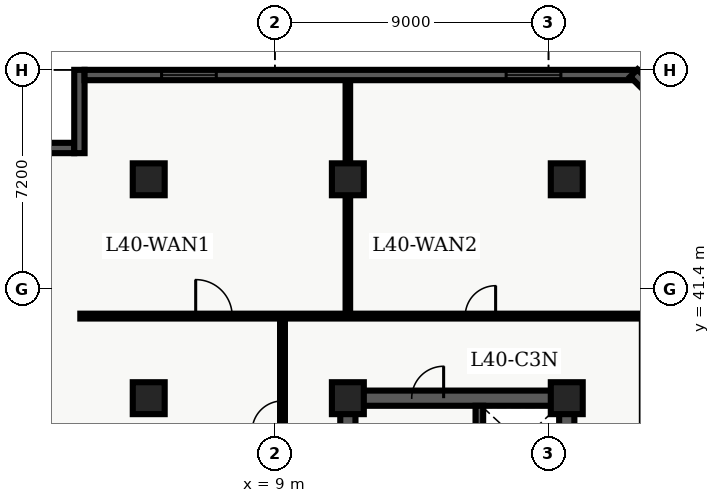
"""IFC4 building model, lengths in metres.
Left out: names, types, materials, properties, quantities, classifications, styles, units other than length and angle.
Written with IfcOpenShell. Run it as: python <this file> out.ifc"""

import sys

from ifc_helpers import new_model, entity, si_unit, converted_unit, direction, frame, origin_with_axes, origin_2d_with_axis, place, context, subcontext, project, spatial, polyline, rectangle, outline, extrude, element, fill, save


model = new_model("IFC4")
c1 = context("Model", 3, precision=1e-05, world=origin_with_axes(), true_north=direction((0.0, 1.0)))
c2 = subcontext(c1, "Body", "Model", "MODEL_VIEW")
j1 = project(units=[si_unit("LENGTHUNIT", "METRE"), converted_unit("PLANEANGLEUNIT", "DEGREE", entity("IfcPlaneAngleMeasure", 0.017), si_unit("PLANEANGLEUNIT", "RADIAN"), dimensions=[0, 0, 0, 0, 0, 0, 0])], contexts=[c1])
p1 = place(None, origin_with_axes())
s1 = spatial("IfcSite", under=j1, at=p1, CompositionType="ELEMENT")
p2 = place(p1, origin_with_axes())
s2 = spatial("IfcBuilding", under=s1, at=p2, CompositionType="ELEMENT")
p3 = place(p2, frame((0.0, 0.0, 164.1), z_axis=(0.0, 0.0, 1.0), x_axis=(1.0, 0.0, 0.0)))
s3 = spatial("IfcBuildingStorey", under=s2, at=p3, CompositionType="ELEMENT", Elevation=164.1)
p4 = place(p3, frame((11.4, 10.8, 0.0), z_axis=(0.0, 0.0, 1.0), x_axis=(0.0, 1.0, 0.0)))
e1 = element("IfcWall", 1, at=p4, inside=s3, PredefinedType="SHEAR", context=c2, shape_type="SweptSolid", body=[
    extrude(outline(polyline([(0.0, -0.25), (27.0, -0.25), (27.0, 0.25), (0.0, 0.25), (0.0, -0.25)])), origin_with_axes(), (0.0, 0.0, 1.0), 3.66),
])
p5 = place(p3, frame((11.4, 37.8, 0.0), z_axis=(0.0, 0.0, 1.0), x_axis=(1.0, 0.0, 0.0)))
e2 = element("IfcWall", 2, at=p5, inside=s3, PredefinedType="SHEAR", context=c2, shape_type="SweptSolid", body=[
    extrude(outline(polyline([(0.0, -0.25), (7.2, -0.25), (7.2, 0.25), (0.0, 0.25), (0.0, -0.25)])), origin_with_axes(), (0.0, 0.0, 1.0), 3.66),
])
p6 = place(p5, frame((2.625, 0.0, 0.0), z_axis=(0.0, 0.0, 1.0), x_axis=(1.0, 0.0, 0.0)))
e3 = element("IfcOpeningElement", 3, at=p6, cuts=e2, PredefinedType="OPENING", context=c2, shape_type="SweptSolid", body=[
    extrude(rectangle(XDim=1.05, YDim=0.52, at=origin_2d_with_axis()), origin_with_axes(), (0.0, 0.0, 1.0), 2.15),
])
p7 = place(p3, frame((18.6, 24.3, 0.0), z_axis=(0.0, 0.0, 1.0), x_axis=(0.0, 1.0, 0.0)))
e4 = element("IfcWall", 4, at=p7, inside=s3, PredefinedType="SHEAR", context=c2, shape_type="SweptSolid", body=[
    extrude(outline(polyline([(0.0, -0.25), (13.5, -0.25), (13.5, 0.25), (0.0, 0.25), (0.0, -0.25)])), origin_with_axes(), (0.0, 0.0, 1.0), 3.66),
])
p8 = place(p7, frame((5.65, 0.0, 0.0), z_axis=(0.0, 0.0, 1.0), x_axis=(1.0, 0.0, 0.0)))
e5 = element("IfcOpeningElement", 5, at=p8, cuts=e4, PredefinedType="OPENING", context=c2, shape_type="SweptSolid", body=[
    extrude(rectangle(XDim=1.1, YDim=0.52, at=origin_2d_with_axis()), origin_with_axes(), (0.0, 0.0, 1.0), 2.15),
])
p9 = place(p7, frame((7.75, 0.0, 0.0), z_axis=(0.0, 0.0, 1.0), x_axis=(1.0, 0.0, 0.0)))
e6 = element("IfcOpeningElement", 6, at=p9, cuts=e4, PredefinedType="OPENING", context=c2, shape_type="SweptSolid", body=[
    extrude(rectangle(XDim=1.1, YDim=0.52, at=origin_2d_with_axis()), origin_with_axes(), (0.0, 0.0, 1.0), 2.15),
])
p10 = place(p3, frame((15.725, 28.9, 0.0), z_axis=(0.0, 0.0, 1.0), x_axis=(0.0, 1.0, 0.0)))
e7 = element("IfcWall", 7, at=p10, inside=s3, PredefinedType="SHEAR", context=c2, shape_type="SweptSolid", body=[
    extrude(outline(polyline([(0.0, -0.125), (8.65, -0.125), (8.65, 0.125), (0.0, 0.125), (0.0, -0.125)])), origin_with_axes(), (0.0, 0.0, 1.0), 3.66),
])
for number, where, z_axis, x_axis in (
    (8, (11.4, 37.8, 0.0), (0.0, 0.0, 1.0), (1.0, 0.0, 0.0)),
    (9, (11.4, 45.0, 0.0), (0.0, 0.0, 1.0), (1.0, 0.0, 0.0)),
    (10, (18.6, 37.8, 0.0), (0.0, 0.0, 1.0), (1.0, 0.0, 0.0)),
    (11, (18.6, 45.0, 0.0), (0.0, 0.0, 1.0), (1.0, 0.0, 0.0)),
    (12, (4.85, 37.8, 0.0), (0.0, 0.0, 1.0), (1.0, 0.0, 0.0)),
    (13, (4.85, 45.0, 0.0), (0.0, 0.0, 1.0), (1.0, 0.0, 0.0)),
):
    element("IfcColumn", number, at=place(p3, frame(where, z_axis=z_axis, x_axis=x_axis)), inside=s3, PredefinedType="COLUMN", context=c2, shape_type="SweptSolid", body=[
        extrude(rectangle(XDim=1.05, YDim=1.05, at=origin_2d_with_axis()), origin_with_axes(), (0.0, 0.0, 1.0), 3.9),
    ])
p11 = place(p3, frame((2.6, 40.5, 0.0), z_axis=(0.0, 0.0, 1.0), x_axis=(1.0, 0.0, 0.0)))
e14 = element("IfcWall", 14, at=p11, inside=s3, PredefinedType="PARTITIONING", context=c2, shape_type="SweptSolid", body=[
    extrude(outline(polyline([(0.0, -0.08), (20.884, -0.08), (20.884, 0.08), (0.0, 0.08), (0.0, -0.08)])), origin_with_axes(), (0.0, 0.0, 1.0), 2.7),
])
p12 = place(p11, frame((4.395, 0.0, 0.0), z_axis=(0.0, 0.0, 1.0), x_axis=(1.0, 0.0, 0.0)))
e15 = element("IfcOpeningElement", 15, at=p12, cuts=e14, PredefinedType="OPENING", context=c2, shape_type="SweptSolid", body=[
    extrude(rectangle(XDim=1.2, YDim=0.18, at=origin_2d_with_axis()), origin_with_axes(), (0.0, 0.0, 1.0), 2.2),
])
p13 = place(p11, frame((13.16, 0.0, 0.0), z_axis=(0.0, 0.0, 1.0), x_axis=(1.0, 0.0, 0.0)))
e16 = element("IfcOpeningElement", 16, at=p13, cuts=e14, PredefinedType="OPENING", context=c2, shape_type="SweptSolid", body=[
    extrude(rectangle(XDim=1.0, YDim=0.18, at=origin_2d_with_axis()), origin_with_axes(), (0.0, 0.0, 1.0), 2.15),
])
p14 = place(p3, frame((9.25, 24.4, 0.0), z_axis=(0.0, 0.0, 1.0), x_axis=(0.0, 1.0, 0.0)))
e17 = element("IfcWall", 17, at=p14, inside=s3, PredefinedType="PARTITIONING", context=c2, shape_type="SweptSolid", body=[
    extrude(outline(polyline([(0.0, -0.08), (16.1, -0.08), (16.1, 0.08), (0.0, 0.08), (0.0, -0.08)])), origin_with_axes(), (0.0, 0.0, 1.0), 2.7),
])
p15 = place(p14, frame((2.325, 0.0, 0.0), z_axis=(0.0, 0.0, 1.0), x_axis=(1.0, 0.0, 0.0)))
e18 = element("IfcOpeningElement", 18, at=p15, cuts=e17, PredefinedType="OPENING", context=c2, shape_type="SweptSolid", body=[
    extrude(rectangle(XDim=1.0, YDim=0.18, at=origin_2d_with_axis()), origin_with_axes(), (0.0, 0.0, 1.0), 2.15),
])
p16 = place(p14, frame((7.111, 0.0, 0.0), z_axis=(0.0, 0.0, 1.0), x_axis=(1.0, 0.0, 0.0)))
e19 = element("IfcOpeningElement", 19, at=p16, cuts=e17, PredefinedType="OPENING", context=c2, shape_type="SweptSolid", body=[
    extrude(rectangle(XDim=1.0, YDim=0.18, at=origin_2d_with_axis()), origin_with_axes(), (0.0, 0.0, 1.0), 2.15),
])
p17 = place(p14, frame((12.81, 0.0, 0.0), z_axis=(0.0, 0.0, 1.0), x_axis=(1.0, 0.0, 0.0)))
e20 = element("IfcOpeningElement", 20, at=p17, cuts=e17, PredefinedType="OPENING", context=c2, shape_type="SweptSolid", body=[
    extrude(rectangle(XDim=1.0, YDim=0.18, at=origin_2d_with_axis()), origin_with_axes(), (0.0, 0.0, 1.0), 2.15),
])
p18 = place(p3, frame((11.4, 40.6, 0.0), z_axis=(0.0, 0.0, 1.0), x_axis=(0.0, 1.0, 0.0)))
e21 = element("IfcWall", 21, at=p18, inside=s3, PredefinedType="PARTITIONING", context=c2, shape_type="SweptSolid", body=[
    extrude(outline(polyline([(0.0, -0.075), (7.665, -0.075), (7.665, 0.075), (0.0, 0.075), (0.0, -0.075)])), origin_with_axes(), (0.0, 0.0, 1.0), 2.7),
])
p19 = place(p3, frame((0.34, 46.03, 0.0), z_axis=(0.0, 0.0, 1.0), x_axis=(1.0, 0.0, 0.0)))
e22 = element("IfcWall", 22, at=p19, inside=s3, PredefinedType="SOLIDWALL", context=c2, shape_type="SweptSolid", body=[
    extrude(outline(polyline([(0.0, -0.17), (2.06, -0.17), (2.06, 0.17), (0.0, 0.17), (0.0, -0.17)])), origin_with_axes(), (0.0, 0.0, 1.0), 3.66),
])
p20 = place(p3, frame((2.57, 45.86, 0.0), z_axis=(0.0, 0.0, 1.0), x_axis=(0.0, 1.0, 0.0)))
e23 = element("IfcWall", 23, at=p20, inside=s3, PredefinedType="SOLIDWALL", context=c2, shape_type="SweptSolid", body=[
    extrude(outline(polyline([(0.0, -0.17), (2.74, -0.17), (2.74, 0.17), (0.0, 0.17), (0.0, -0.17)])), origin_with_axes(), (0.0, 0.0, 1.0), 3.66),
])
p21 = place(p3, frame((2.74, 48.43, 0.0), z_axis=(0.0, 0.0, 1.0), x_axis=(1.0, 0.0, 0.0)))
e24 = element("IfcWall", 24, at=p21, inside=s3, PredefinedType="SOLIDWALL", context=c2, shape_type="SweptSolid", body=[
    extrude(outline(polyline([(0.0, -0.17), (18.199, -0.17), (18.199, 0.17), (0.0, 0.17), (0.0, -0.17)])), origin_with_axes(), (0.0, 0.0, 1.0), 3.66),
])
p22 = place(p21, frame((3.433, 0.0, 0.45), z_axis=(0.0, 0.0, 1.0), x_axis=(1.0, 0.0, 0.0)))
e25 = element("IfcOpeningElement", 25, at=p22, cuts=e24, PredefinedType="OPENING", context=c2, shape_type="SweptSolid", body=[
    extrude(rectangle(XDim=1.8, YDim=0.36, at=origin_2d_with_axis()), origin_with_axes(), (0.0, 0.0, 1.0), 2.1),
])
p23 = place(p21, frame((14.766, 0.0, 0.45), z_axis=(0.0, 0.0, 1.0), x_axis=(1.0, 0.0, 0.0)))
e26 = element("IfcOpeningElement", 26, at=p23, cuts=e24, PredefinedType="OPENING", context=c2, shape_type="SweptSolid", body=[
    extrude(rectangle(XDim=1.8, YDim=0.36, at=origin_2d_with_axis()), origin_with_axes(), (0.0, 0.0, 1.0), 2.1),
])
p24 = place(p3, frame((20.805, 48.494, 0.0), z_axis=(0.0, 0.0, 1.0), x_axis=(0.707107, -0.707107, 0.0)))
e27 = element("IfcWall", 27, at=p24, inside=s3, PredefinedType="SOLIDWALL", context=c2, shape_type="SweptSolid", body=[
    extrude(outline(polyline([(0.0, -0.17), (4.093, -0.17), (4.093, 0.17), (0.0, 0.17), (0.0, -0.17)])), origin_with_axes(), (0.0, 0.0, 1.0), 3.66),
])
p25 = place(p5, frame((2.625, 0.0, 0.0), z_axis=(0.0, 0.0, 1.0), x_axis=(1.0, 0.0, 0.0)))
e28 = element("IfcDoor", 28, at=p25, inside=s3, OperationType="SINGLE_SWING_RIGHT", PredefinedType="DOOR", context=c2, shape_type="SweptSolid", body=[
    extrude(rectangle(XDim=1.05, YDim=0.09, at=origin_2d_with_axis()), origin_with_axes(), (0.0, 0.0, 1.0), 2.15),
])
fill(e3, e28)
p26 = place(p14, frame((12.81, 0.0, 0.0), z_axis=(0.0, 0.0, 1.0), x_axis=(1.0, 0.0, 0.0)))
e29 = element("IfcDoor", 29, at=p26, inside=s3, OperationType="SINGLE_SWING_LEFT", PredefinedType="DOOR", context=c2, shape_type="SweptSolid", body=[
    extrude(rectangle(XDim=1.0, YDim=0.09, at=origin_2d_with_axis()), origin_with_axes(), (0.0, 0.0, 1.0), 2.15),
])
fill(e20, e29)
p27 = place(p11, frame((4.395, 0.0, 0.0), z_axis=(0.0, 0.0, 1.0), x_axis=(1.0, 0.0, 0.0)))
e30 = element("IfcDoor", 30, at=p27, inside=s3, OperationType="SINGLE_SWING_LEFT", PredefinedType="DOOR", context=c2, shape_type="SweptSolid", body=[
    extrude(rectangle(XDim=1.2, YDim=0.09, at=origin_2d_with_axis()), origin_with_axes(), (0.0, 0.0, 1.0), 2.2),
])
fill(e15, e30)
p28 = place(p11, frame((13.16, 0.0, 0.0), z_axis=(0.0, 0.0, 1.0), x_axis=(1.0, 0.0, 0.0)))
e31 = element("IfcDoor", 31, at=p28, inside=s3, OperationType="SINGLE_SWING_RIGHT", PredefinedType="DOOR", context=c2, shape_type="SweptSolid", body=[
    extrude(rectangle(XDim=1.0, YDim=0.09, at=origin_2d_with_axis()), origin_with_axes(), (0.0, 0.0, 1.0), 2.15),
])
fill(e16, e31)
p29 = place(p21, frame((3.433, 0.0, 0.45), z_axis=(0.0, 0.0, 1.0), x_axis=(1.0, 0.0, 0.0)))
e32 = element("IfcWindow", 32, at=p29, inside=s3, PredefinedType="WINDOW", context=c2, shape_type="SweptSolid", body=[
    extrude(rectangle(XDim=1.8, YDim=0.09, at=origin_2d_with_axis()), origin_with_axes(), (0.0, 0.0, 1.0), 2.1),
])
fill(e25, e32)
p30 = place(p21, frame((14.766, 0.0, 0.45), z_axis=(0.0, 0.0, 1.0), x_axis=(1.0, 0.0, 0.0)))
e33 = element("IfcWindow", 33, at=p30, inside=s3, PredefinedType="WINDOW", context=c2, shape_type="SweptSolid", body=[
    extrude(rectangle(XDim=1.8, YDim=0.09, at=origin_2d_with_axis()), origin_with_axes(), (0.0, 0.0, 1.0), 2.1),
])
fill(e26, e33)
save(model, sys.argv[1])
